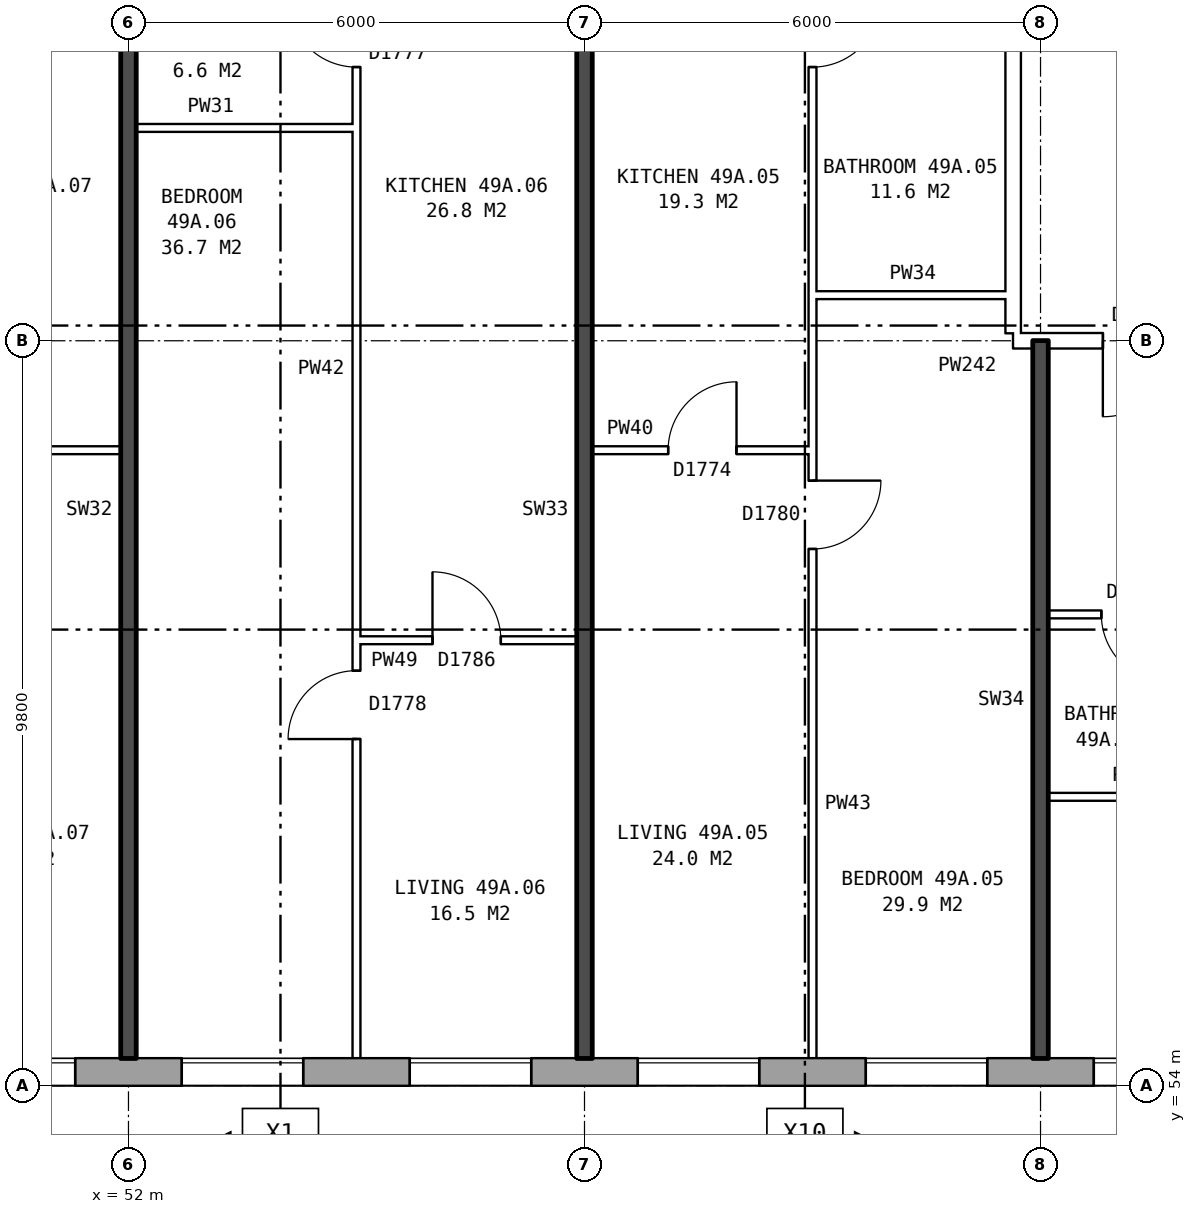
"""IFC4 building model, lengths in metres.
Left out: names, types, materials, properties, quantities, classifications, styles, units other than length and angle.
Written with IfcOpenShell. Run it as: python <this file> out.ifc"""

import sys

from ifc_helpers import new_model, si_unit, direction, frame, frame_2d, origin, place, context, subcontext, project, spatial, rectangle, extrude, element, fill, save


model = new_model("IFC4")
c1 = context("Model", 3, precision=1e-05, world=origin(), true_north=direction((0.0, 1.0)))
c2 = subcontext(c1, "Body", "Model", "MODEL_VIEW")
j1 = project(units=[si_unit("LENGTHUNIT", "METRE"), si_unit("PLANEANGLEUNIT", "RADIAN")], contexts=[c1])
p1 = place(None, origin())
s1 = spatial("IfcSite", under=j1, at=p1, CompositionType="ELEMENT")
p2 = place(p1, origin())
s2 = spatial("IfcBuilding", under=s1, at=p2, CompositionType="ELEMENT")
p3 = place(p2, frame((0.0, 0.0, 175.8)))
s3 = spatial("IfcBuildingStorey", under=s2, at=p3, CompositionType="ELEMENT", Elevation=175.8)
p4 = place(p3, frame((33.325, 54.18, 0.0), z_axis=(0.0, 0.0, 1.0), x_axis=(1.0, 0.0, 0.0)))
e1 = element("IfcWall", 1, at=p4, inside=s3, PredefinedType="STANDARD", context=c2, shape_type="SweptSolid", body=[
    extrude(rectangle(XDim=39.601, YDim=0.36, at=frame_2d((19.8, 0.0))), origin(), (0.0, 0.0, 1.0), 2.85),
])
p5 = place(p4, frame((0.875, 0.0, 0.8)))
e2 = element("IfcOpeningElement", 2, at=p5, cuts=e1, PredefinedType="OPENING", context=c2, shape_type="SweptSolid", body=[
    extrude(rectangle(XDim=0.6, YDim=1.8, at=frame_2d((0.3, 0.9))), frame((0.0, 0.19, 0.0), z_axis=(0.0, -1.0, 0.0), x_axis=(1.0, 0.0, 0.0)), (0.0, 0.0, 1.0), 0.38),
])
p6 = place(p4, frame((4.375, 0.0, 0.8)))
e3 = element("IfcOpeningElement", 3, at=p6, cuts=e1, PredefinedType="OPENING", context=c2, shape_type="SweptSolid", body=[
    extrude(rectangle(XDim=1.6, YDim=1.8, at=frame_2d((0.8, 0.9))), frame((0.0, 0.19, 0.0), z_axis=(0.0, -1.0, 0.0), x_axis=(1.0, 0.0, 0.0)), (0.0, 0.0, 1.0), 0.38),
])
p7 = place(p4, frame((7.375, 0.0, 0.8)))
e4 = element("IfcOpeningElement", 4, at=p7, cuts=e1, PredefinedType="OPENING", context=c2, shape_type="SweptSolid", body=[
    extrude(rectangle(XDim=1.6, YDim=1.8, at=frame_2d((0.8, 0.9))), frame((0.0, 0.19, 0.0), z_axis=(0.0, -1.0, 0.0), x_axis=(1.0, 0.0, 0.0)), (0.0, 0.0, 1.0), 0.38),
])
p8 = place(p4, frame((10.375, 0.0, 0.8)))
e5 = element("IfcOpeningElement", 5, at=p8, cuts=e1, PredefinedType="OPENING", context=c2, shape_type="SweptSolid", body=[
    extrude(rectangle(XDim=1.6, YDim=1.8, at=frame_2d((0.8, 0.9))), frame((0.0, 0.19, 0.0), z_axis=(0.0, -1.0, 0.0), x_axis=(1.0, 0.0, 0.0)), (0.0, 0.0, 1.0), 0.38),
])
p9 = place(p4, frame((13.375, 0.0, 0.8)))
e6 = element("IfcOpeningElement", 6, at=p9, cuts=e1, PredefinedType="OPENING", context=c2, shape_type="SweptSolid", body=[
    extrude(rectangle(XDim=1.6, YDim=1.8, at=frame_2d((0.8, 0.9))), frame((0.0, 0.19, 0.0), z_axis=(0.0, -1.0, 0.0), x_axis=(1.0, 0.0, 0.0)), (0.0, 0.0, 1.0), 0.38),
])
p10 = place(p4, frame((16.375, 0.0, 0.8)))
e7 = element("IfcOpeningElement", 7, at=p10, cuts=e1, PredefinedType="OPENING", context=c2, shape_type="SweptSolid", body=[
    extrude(rectangle(XDim=1.6, YDim=1.8, at=frame_2d((0.8, 0.9))), frame((0.0, 0.19, 0.0), z_axis=(0.0, -1.0, 0.0), x_axis=(1.0, 0.0, 0.0)), (0.0, 0.0, 1.0), 0.38),
])
p11 = place(p4, frame((19.375, 0.0, 0.8)))
e8 = element("IfcOpeningElement", 8, at=p11, cuts=e1, PredefinedType="OPENING", context=c2, shape_type="SweptSolid", body=[
    extrude(rectangle(XDim=1.6, YDim=1.8, at=frame_2d((0.8, 0.9))), frame((0.0, 0.19, 0.0), z_axis=(0.0, -1.0, 0.0), x_axis=(1.0, 0.0, 0.0)), (0.0, 0.0, 1.0), 0.38),
])
p12 = place(p4, frame((22.375, 0.0, 0.8)))
e9 = element("IfcOpeningElement", 9, at=p12, cuts=e1, PredefinedType="OPENING", context=c2, shape_type="SweptSolid", body=[
    extrude(rectangle(XDim=1.6, YDim=1.8, at=frame_2d((0.8, 0.9))), frame((0.0, 0.19, 0.0), z_axis=(0.0, -1.0, 0.0), x_axis=(1.0, 0.0, 0.0)), (0.0, 0.0, 1.0), 0.38),
])
p13 = place(p4, frame((25.375, 0.0, 0.8)))
e10 = element("IfcOpeningElement", 10, at=p13, cuts=e1, PredefinedType="OPENING", context=c2, shape_type="SweptSolid", body=[
    extrude(rectangle(XDim=1.6, YDim=1.8, at=frame_2d((0.8, 0.9))), frame((0.0, 0.19, 0.0), z_axis=(0.0, -1.0, 0.0), x_axis=(1.0, 0.0, 0.0)), (0.0, 0.0, 1.0), 0.38),
])
p14 = place(p4, frame((28.375, 0.0, 0.8)))
e11 = element("IfcOpeningElement", 11, at=p14, cuts=e1, PredefinedType="OPENING", context=c2, shape_type="SweptSolid", body=[
    extrude(rectangle(XDim=1.6, YDim=1.8, at=frame_2d((0.8, 0.9))), frame((0.0, 0.19, 0.0), z_axis=(0.0, -1.0, 0.0), x_axis=(1.0, 0.0, 0.0)), (0.0, 0.0, 1.0), 0.38),
])
p15 = place(p4, frame((31.375, 0.0, 0.8)))
e12 = element("IfcOpeningElement", 12, at=p15, cuts=e1, PredefinedType="OPENING", context=c2, shape_type="SweptSolid", body=[
    extrude(rectangle(XDim=1.6, YDim=1.8, at=frame_2d((0.8, 0.9))), frame((0.0, 0.19, 0.0), z_axis=(0.0, -1.0, 0.0), x_axis=(1.0, 0.0, 0.0)), (0.0, 0.0, 1.0), 0.38),
])
p16 = place(p4, frame((33.275, 0.0, 0.8)))
e13 = element("IfcOpeningElement", 13, at=p16, cuts=e1, PredefinedType="OPENING", context=c2, shape_type="SweptSolid", body=[
    extrude(rectangle(XDim=1.6, YDim=1.8, at=frame_2d((0.8, 0.9))), frame((0.0, 0.19, 0.0), z_axis=(0.0, -1.0, 0.0), x_axis=(1.0, 0.0, 0.0)), (0.0, 0.0, 1.0), 0.38),
])
p17 = place(p4, frame((37.025, 0.0, 1.7)))
e14 = element("IfcOpeningElement", 14, at=p17, cuts=e1, PredefinedType="OPENING", context=c2, shape_type="SweptSolid", body=[
    extrude(rectangle(XDim=0.6, YDim=0.9, at=frame_2d((0.3, 0.45))), frame((0.0, 0.19, 0.0), z_axis=(0.0, -1.0, 0.0), x_axis=(1.0, 0.0, 0.0)), (0.0, 0.0, 1.0), 0.38),
])
p18 = place(p4, frame((1.775, 0.0, 1.7)))
e15 = element("IfcOpeningElement", 15, at=p18, cuts=e1, PredefinedType="OPENING", context=c2, shape_type="SweptSolid", body=[
    extrude(rectangle(XDim=0.8, YDim=0.9, at=frame_2d((0.4, 0.45))), frame((0.0, 0.19, 0.0), z_axis=(0.0, -1.0, 0.0), x_axis=(1.0, 0.0, 0.0)), (0.0, 0.0, 1.0), 0.38),
])
p19 = place(p4, frame((35.175, 0.0, 0.8)))
e16 = element("IfcOpeningElement", 16, at=p19, cuts=e1, PredefinedType="OPENING", context=c2, shape_type="SweptSolid", body=[
    extrude(rectangle(XDim=0.6, YDim=0.9, at=frame_2d((0.3, 0.45))), frame((0.0, 0.19, 0.0), z_axis=(0.0, -1.0, 0.0), x_axis=(1.0, 0.0, 0.0)), (0.0, 0.0, 1.0), 0.38),
])
p20 = place(p4, frame((37.975, 0.0, 0.8)))
e17 = element("IfcOpeningElement", 17, at=p20, cuts=e1, PredefinedType="OPENING", context=c2, shape_type="SweptSolid", body=[
    extrude(rectangle(XDim=1.2, YDim=1.8, at=frame_2d((0.6, 0.9))), frame((0.0, 0.19, 0.0), z_axis=(0.0, -1.0, 0.0), x_axis=(1.0, 0.0, 0.0)), (0.0, 0.0, 1.0), 0.38),
])
p21 = place(p3, frame((63.64, 63.9, 0.0), z_axis=(0.0, 0.0, 1.0), x_axis=(0.0, 1.0, 0.0)))
e18 = element("IfcWall", 18, at=p21, inside=s3, PredefinedType="PARTITIONING", context=c2, shape_type="SweptSolid", body=[
    extrude(rectangle(XDim=12.2, YDim=0.2, at=frame_2d((6.1, 0.0))), origin(), (0.0, 0.0, 1.0), 2.85),
])
p22 = place(p21, frame((5.1, 0.0, 0.0)))
e19 = element("IfcOpeningElement", 19, at=p22, cuts=e18, PredefinedType="OPENING", context=c2, shape_type="SweptSolid", body=[
    extrude(rectangle(XDim=2.0, YDim=2.1, at=frame_2d((1.0, 1.05))), frame((0.0, 0.11, 0.0), z_axis=(0.0, -1.0, 0.0), x_axis=(1.0, 0.0, 0.0)), (0.0, 0.0, 1.0), 0.22),
])
p23 = place(p3, frame((64.1, 57.8, 0.0), z_axis=(0.0, 0.0, 1.0), x_axis=(1.0, 0.0, 0.0)))
e20 = element("IfcWall", 20, at=p23, inside=s3, PredefinedType="PARTITIONING", context=c2, shape_type="SweptSolid", body=[
    extrude(rectangle(XDim=2.3, YDim=0.1, at=frame_2d((1.15, 0.0))), origin(), (0.0, 0.0, 1.0), 2.85),
])
p24 = place(p3, frame((55.0, 59.86, 0.0), z_axis=(0.0, 0.0, 1.0), x_axis=(1.0, 0.0, 0.0)))
e21 = element("IfcWall", 21, at=p24, inside=s3, PredefinedType="PARTITIONING", context=c2, shape_type="SweptSolid", body=[
    extrude(rectangle(XDim=2.9, YDim=0.1, at=frame_2d((1.45, 0.0))), origin(), (0.0, 0.0, 1.0), 2.85),
])
p25 = place(p24, frame((1.0, 0.0, 0.0)))
e22 = element("IfcOpeningElement", 22, at=p25, cuts=e21, PredefinedType="OPENING", context=c2, shape_type="SweptSolid", body=[
    extrude(rectangle(XDim=0.9, YDim=2.1, at=frame_2d((0.45, 1.05))), frame((0.0, 0.06, 0.0), z_axis=(0.0, -1.0, 0.0), x_axis=(1.0, 0.0, 0.0)), (0.0, 0.0, 1.0), 0.12),
])
p26 = place(p3, frame((64.1, 60.2, 0.0), z_axis=(0.0, 0.0, 1.0), x_axis=(1.0, 0.0, 0.0)))
e23 = element("IfcWall", 23, at=p26, inside=s3, PredefinedType="PARTITIONING", context=c2, shape_type="SweptSolid", body=[
    extrude(rectangle(XDim=5.8, YDim=0.1, at=frame_2d((2.9, 0.0))), origin(), (0.0, 0.0, 1.0), 2.85),
])
p27 = place(p26, frame((3.6, 0.0, 0.0)))
e24 = element("IfcOpeningElement", 24, at=p27, cuts=e23, PredefinedType="OPENING", context=c2, shape_type="SweptSolid", body=[
    extrude(rectangle(XDim=0.9, YDim=2.1, at=frame_2d((0.45, 1.05))), frame((0.0, 0.06, 0.0), z_axis=(0.0, -1.0, 0.0), x_axis=(1.0, 0.0, 0.0)), (0.0, 0.0, 1.0), 0.12),
])
p28 = place(p26, frame((0.7, 0.0, 0.0)))
e25 = element("IfcOpeningElement", 25, at=p28, cuts=e23, PredefinedType="OPENING", context=c2, shape_type="SweptSolid", body=[
    extrude(rectangle(XDim=0.9, YDim=2.1, at=frame_2d((0.45, 1.05))), frame((0.0, 0.06, 0.0), z_axis=(0.0, -1.0, 0.0), x_axis=(1.0, 0.0, 0.0)), (0.0, 0.0, 1.0), 0.12),
])
p29 = place(p3, frame((49.0, 62.36, 0.0), z_axis=(0.0, 0.0, 1.0), x_axis=(1.0, 0.0, 0.0)))
e26 = element("IfcWall", 26, at=p29, inside=s3, PredefinedType="PARTITIONING", context=c2, shape_type="SweptSolid", body=[
    extrude(rectangle(XDim=2.9, YDim=0.1, at=frame_2d((1.45, 0.0))), origin(), (0.0, 0.0, 1.0), 2.85),
])
p30 = place(p29, frame((1.0, 0.0, 0.0)))
e27 = element("IfcOpeningElement", 27, at=p30, cuts=e26, PredefinedType="OPENING", context=c2, shape_type="SweptSolid", body=[
    extrude(rectangle(XDim=0.9, YDim=2.1, at=frame_2d((0.45, 1.05))), frame((0.0, 0.06, 0.0), z_axis=(0.0, -1.0, 0.0), x_axis=(1.0, 0.0, 0.0)), (0.0, 0.0, 1.0), 0.12),
])
p31 = place(p3, frame((58.1, 62.36, 0.0), z_axis=(0.0, 0.0, 1.0), x_axis=(1.0, 0.0, 0.0)))
e28 = element("IfcWall", 28, at=p31, inside=s3, PredefinedType="PARTITIONING", context=c2, shape_type="SweptSolid", body=[
    extrude(rectangle(XDim=2.9, YDim=0.1, at=frame_2d((1.45, 0.0))), origin(), (0.0, 0.0, 1.0), 2.85),
])
p32 = place(p31, frame((1.0, 0.0, 0.0)))
e29 = element("IfcOpeningElement", 29, at=p32, cuts=e28, PredefinedType="OPENING", context=c2, shape_type="SweptSolid", body=[
    extrude(rectangle(XDim=0.9, YDim=2.1, at=frame_2d((0.45, 1.05))), frame((0.0, 0.06, 0.0), z_axis=(0.0, -1.0, 0.0), x_axis=(1.0, 0.0, 0.0)), (0.0, 0.0, 1.0), 0.12),
])
p33 = place(p3, frame((63.64, 63.8, 0.0), z_axis=(0.0, 0.0, 1.0), x_axis=(1.0, 0.0, 0.0)))
e30 = element("IfcWall", 30, at=p33, inside=s3, PredefinedType="PARTITIONING", context=c2, shape_type="SweptSolid", body=[
    extrude(rectangle(XDim=3.0, YDim=0.2, at=frame_2d((1.5, 0.0))), origin(), (0.0, 0.0, 1.0), 2.85),
])
p34 = place(p33, frame((1.18, 0.0, 0.0)))
e31 = element("IfcOpeningElement", 31, at=p34, cuts=e30, PredefinedType="OPENING", context=c2, shape_type="SweptSolid", body=[
    extrude(rectangle(XDim=1.0, YDim=2.1, at=frame_2d((0.5, 1.05))), frame((0.0, 0.11, 0.0), z_axis=(0.0, -1.0, 0.0), x_axis=(1.0, 0.0, 0.0)), (0.0, 0.0, 1.0), 0.22),
])
p35 = place(p3, frame((61.0, 64.4, 0.0), z_axis=(0.0, 0.0, 1.0), x_axis=(1.0, 0.0, 0.0)))
e32 = element("IfcWall", 32, at=p35, inside=s3, PredefinedType="PARTITIONING", context=c2, shape_type="SweptSolid", body=[
    extrude(rectangle(XDim=2.64, YDim=0.1, at=frame_2d((1.32, 0.0))), origin(), (0.0, 0.0, 1.0), 2.85),
])
p36 = place(p3, frame((52.1, 66.6, 0.0), z_axis=(0.0, 0.0, 1.0), x_axis=(1.0, 0.0, 0.0)))
e33 = element("IfcWall", 33, at=p36, inside=s3, PredefinedType="PARTITIONING", context=c2, shape_type="SweptSolid", body=[
    extrude(rectangle(XDim=2.9, YDim=0.1, at=frame_2d((1.45, 0.0))), origin(), (0.0, 0.0, 1.0), 2.85),
])
p37 = place(p3, frame((52.0, 54.36, 0.0), z_axis=(0.0, 0.0, 1.0), x_axis=(0.0, 1.0, 0.0)))
e34 = element("IfcWall", 34, at=p37, inside=s3, PredefinedType="SOLIDWALL", context=c2, shape_type="SweptSolid", body=[
    extrude(rectangle(XDim=14.44, YDim=0.2, at=frame_2d((7.22, 0.0))), origin(), (0.0, 0.0, 1.0), 2.85),
])
p38 = place(p3, frame((55.0, 54.36, 0.0), z_axis=(0.0, 0.0, 1.0), x_axis=(0.0, 1.0, 0.0)))
e35 = element("IfcWall", 35, at=p38, inside=s3, PredefinedType="PARTITIONING", context=c2, shape_type="SweptSolid", body=[
    extrude(rectangle(XDim=14.34, YDim=0.1, at=frame_2d((7.17, 0.0))), origin(), (0.0, 0.0, 1.0), 2.85),
])
p39 = place(p38, frame((4.2, 0.0, 0.0)))
e36 = element("IfcOpeningElement", 36, at=p39, cuts=e35, PredefinedType="OPENING", context=c2, shape_type="SweptSolid", body=[
    extrude(rectangle(XDim=0.9, YDim=2.1, at=frame_2d((0.45, 1.05))), frame((0.0, 0.06, 0.0), z_axis=(0.0, -1.0, 0.0), x_axis=(1.0, 0.0, 0.0)), (0.0, 0.0, 1.0), 0.12),
])
p40 = place(p38, frame((13.04, 0.0, 0.0)))
e37 = element("IfcOpeningElement", 37, at=p40, cuts=e35, PredefinedType="OPENING", context=c2, shape_type="SweptSolid", body=[
    extrude(rectangle(XDim=0.9, YDim=2.1, at=frame_2d((0.45, 1.05))), frame((0.0, 0.06, 0.0), z_axis=(0.0, -1.0, 0.0), x_axis=(1.0, 0.0, 0.0)), (0.0, 0.0, 1.0), 0.12),
])
p41 = place(p3, frame((58.0, 54.36, 0.0), z_axis=(0.0, 0.0, 1.0), x_axis=(0.0, 1.0, 0.0)))
e38 = element("IfcWall", 38, at=p41, inside=s3, PredefinedType="SOLIDWALL", context=c2, shape_type="SweptSolid", body=[
    extrude(rectangle(XDim=14.44, YDim=0.2, at=frame_2d((7.22, 0.0))), origin(), (0.0, 0.0, 1.0), 2.85),
])
p42 = place(p3, frame((61.0, 54.36, 0.0), z_axis=(0.0, 0.0, 1.0), x_axis=(0.0, 1.0, 0.0)))
e39 = element("IfcWall", 39, at=p42, inside=s3, PredefinedType="PARTITIONING", context=c2, shape_type="SweptSolid", body=[
    extrude(rectangle(XDim=14.34, YDim=0.1, at=frame_2d((7.17, 0.0))), origin(), (0.0, 0.0, 1.0), 2.85),
])
p43 = place(p42, frame((6.7, 0.0, 0.0)))
e40 = element("IfcOpeningElement", 40, at=p43, cuts=e39, PredefinedType="OPENING", context=c2, shape_type="SweptSolid", body=[
    extrude(rectangle(XDim=0.9, YDim=2.1, at=frame_2d((0.45, 1.05))), frame((0.0, 0.06, 0.0), z_axis=(0.0, -1.0, 0.0), x_axis=(1.0, 0.0, 0.0)), (0.0, 0.0, 1.0), 0.12),
])
p44 = place(p42, frame((13.04, 0.0, 0.0)))
e41 = element("IfcOpeningElement", 41, at=p44, cuts=e39, PredefinedType="OPENING", context=c2, shape_type="SweptSolid", body=[
    extrude(rectangle(XDim=0.9, YDim=2.1, at=frame_2d((0.45, 1.05))), frame((0.0, 0.06, 0.0), z_axis=(0.0, -1.0, 0.0), x_axis=(1.0, 0.0, 0.0)), (0.0, 0.0, 1.0), 0.12),
])
p45 = place(p3, frame((64.0, 54.36, 0.0), z_axis=(0.0, 0.0, 1.0), x_axis=(0.0, 1.0, 0.0)))
e42 = element("IfcWall", 42, at=p45, inside=s3, PredefinedType="SOLIDWALL", context=c2, shape_type="SweptSolid", body=[
    extrude(rectangle(XDim=9.44, YDim=0.2, at=frame_2d((4.72, 0.0))), origin(), (0.0, 0.0, 1.0), 2.85),
])
p46 = place(p10, origin())
e43 = element("IfcWindow", 43, at=p46, inside=s3, PartitioningType="SINGLE_PANEL", PredefinedType="WINDOW", context=c2, shape_type="SweptSolid", body=[
    extrude(rectangle(XDim=1.6, YDim=1.8, at=frame_2d((0.8, 0.9))), frame((0.0, 0.15, 0.0), z_axis=(0.0, -1.0, 0.0), x_axis=(1.0, 0.0, 0.0)), (0.0, 0.0, 1.0), 0.06),
])
fill(e7, e43)
p47 = place(p11, origin())
e44 = element("IfcWindow", 44, at=p47, inside=s3, PartitioningType="SINGLE_PANEL", PredefinedType="WINDOW", context=c2, shape_type="SweptSolid", body=[
    extrude(rectangle(XDim=1.6, YDim=1.8, at=frame_2d((0.8, 0.9))), frame((0.0, 0.15, 0.0), z_axis=(0.0, -1.0, 0.0), x_axis=(1.0, 0.0, 0.0)), (0.0, 0.0, 1.0), 0.06),
])
fill(e8, e44)
p48 = place(p12, origin())
e45 = element("IfcWindow", 45, at=p48, inside=s3, PartitioningType="SINGLE_PANEL", PredefinedType="WINDOW", context=c2, shape_type="SweptSolid", body=[
    extrude(rectangle(XDim=1.6, YDim=1.8, at=frame_2d((0.8, 0.9))), frame((0.0, 0.15, 0.0), z_axis=(0.0, -1.0, 0.0), x_axis=(1.0, 0.0, 0.0)), (0.0, 0.0, 1.0), 0.06),
])
fill(e9, e45)
p49 = place(p13, origin())
e46 = element("IfcWindow", 46, at=p49, inside=s3, PartitioningType="SINGLE_PANEL", PredefinedType="WINDOW", context=c2, shape_type="SweptSolid", body=[
    extrude(rectangle(XDim=1.6, YDim=1.8, at=frame_2d((0.8, 0.9))), frame((0.0, 0.15, 0.0), z_axis=(0.0, -1.0, 0.0), x_axis=(1.0, 0.0, 0.0)), (0.0, 0.0, 1.0), 0.06),
])
fill(e10, e46)
p50 = place(p14, origin())
e47 = element("IfcWindow", 47, at=p50, inside=s3, PartitioningType="SINGLE_PANEL", PredefinedType="WINDOW", context=c2, shape_type="SweptSolid", body=[
    extrude(rectangle(XDim=1.6, YDim=1.8, at=frame_2d((0.8, 0.9))), frame((0.0, 0.15, 0.0), z_axis=(0.0, -1.0, 0.0), x_axis=(1.0, 0.0, 0.0)), (0.0, 0.0, 1.0), 0.06),
])
fill(e11, e47)
p51 = place(p15, origin())
e48 = element("IfcWindow", 48, at=p51, inside=s3, PartitioningType="SINGLE_PANEL", PredefinedType="WINDOW", context=c2, shape_type="SweptSolid", body=[
    extrude(rectangle(XDim=1.6, YDim=1.8, at=frame_2d((0.8, 0.9))), frame((0.0, 0.15, 0.0), z_axis=(0.0, -1.0, 0.0), x_axis=(1.0, 0.0, 0.0)), (0.0, 0.0, 1.0), 0.06),
])
fill(e12, e48)
p52 = place(p34, frame((1.0, 0.0, 0.0), z_axis=(0.0, 0.0, 1.0), x_axis=(-1.0, 0.0, 0.0)))
e49 = element("IfcDoor", 49, at=p52, inside=s3, OperationType="SINGLE_SWING_RIGHT", PredefinedType="DOOR", context=c2, shape_type="SweptSolid", body=[
    extrude(rectangle(XDim=1.0, YDim=2.1, at=frame_2d((0.5, 1.05))), frame((0.0, 0.025, 0.0), z_axis=(0.0, -1.0, 0.0), x_axis=(1.0, 0.0, 0.0)), (0.0, 0.0, 1.0), 0.05),
])
fill(e31, e49)
p53 = place(p28, frame((0.9, 0.0, 0.0), z_axis=(0.0, 0.0, 1.0), x_axis=(-1.0, 0.0, 0.0)))
e50 = element("IfcDoor", 50, at=p53, inside=s3, OperationType="SINGLE_SWING_LEFT", PredefinedType="DOOR", context=c2, shape_type="SweptSolid", body=[
    extrude(rectangle(XDim=0.9, YDim=2.1, at=frame_2d((0.45, 1.05))), frame((0.0, 0.025, 0.0), z_axis=(0.0, -1.0, 0.0), x_axis=(1.0, 0.0, 0.0)), (0.0, 0.0, 1.0), 0.05),
])
fill(e25, e50)
p54 = place(p43, frame((0.9, 0.0, 0.0), z_axis=(0.0, 0.0, 1.0), x_axis=(-1.0, 0.0, 0.0)))
e51 = element("IfcDoor", 51, at=p54, inside=s3, OperationType="SINGLE_SWING_LEFT", PredefinedType="DOOR", context=c2, shape_type="SweptSolid", body=[
    extrude(rectangle(XDim=0.9, YDim=2.1, at=frame_2d((0.45, 1.05))), frame((0.0, 0.025, 0.0), z_axis=(0.0, -1.0, 0.0), x_axis=(1.0, 0.0, 0.0)), (0.0, 0.0, 1.0), 0.05),
])
fill(e40, e51)
p55 = place(p32, origin())
e52 = element("IfcDoor", 52, at=p55, inside=s3, OperationType="SINGLE_SWING_RIGHT", PredefinedType="DOOR", context=c2, shape_type="SweptSolid", body=[
    extrude(rectangle(XDim=0.9, YDim=2.1, at=frame_2d((0.45, 1.05))), frame((0.0, 0.025, 0.0), z_axis=(0.0, -1.0, 0.0), x_axis=(1.0, 0.0, 0.0)), (0.0, 0.0, 1.0), 0.05),
])
fill(e29, e52)
p56 = place(p44, frame((0.9, 0.0, 0.0), z_axis=(0.0, 0.0, 1.0), x_axis=(-1.0, 0.0, 0.0)))
e53 = element("IfcDoor", 53, at=p56, inside=s3, OperationType="SINGLE_SWING_LEFT", PredefinedType="DOOR", context=c2, shape_type="SweptSolid", body=[
    extrude(rectangle(XDim=0.9, YDim=2.1, at=frame_2d((0.45, 1.05))), frame((0.0, 0.025, 0.0), z_axis=(0.0, -1.0, 0.0), x_axis=(1.0, 0.0, 0.0)), (0.0, 0.0, 1.0), 0.05),
])
fill(e41, e53)
p57 = place(p39, origin())
e54 = element("IfcDoor", 54, at=p57, inside=s3, OperationType="SINGLE_SWING_LEFT", PredefinedType="DOOR", context=c2, shape_type="SweptSolid", body=[
    extrude(rectangle(XDim=0.9, YDim=2.1, at=frame_2d((0.45, 1.05))), frame((0.0, 0.025, 0.0), z_axis=(0.0, -1.0, 0.0), x_axis=(1.0, 0.0, 0.0)), (0.0, 0.0, 1.0), 0.05),
])
fill(e36, e54)
p58 = place(p25, origin())
e55 = element("IfcDoor", 55, at=p58, inside=s3, OperationType="SINGLE_SWING_LEFT", PredefinedType="DOOR", context=c2, shape_type="SweptSolid", body=[
    extrude(rectangle(XDim=0.9, YDim=2.1, at=frame_2d((0.45, 1.05))), frame((0.0, 0.025, 0.0), z_axis=(0.0, -1.0, 0.0), x_axis=(1.0, 0.0, 0.0)), (0.0, 0.0, 1.0), 0.05),
])
fill(e22, e55)
p59 = place(p40, origin())
e56 = element("IfcDoor", 56, at=p59, inside=s3, OperationType="SINGLE_SWING_RIGHT", PredefinedType="DOOR", context=c2, shape_type="SweptSolid", body=[
    extrude(rectangle(XDim=0.9, YDim=2.1, at=frame_2d((0.45, 1.05))), frame((0.0, 0.025, 0.0), z_axis=(0.0, -1.0, 0.0), x_axis=(1.0, 0.0, 0.0)), (0.0, 0.0, 1.0), 0.05),
])
fill(e37, e56)
save(model, sys.argv[1])
